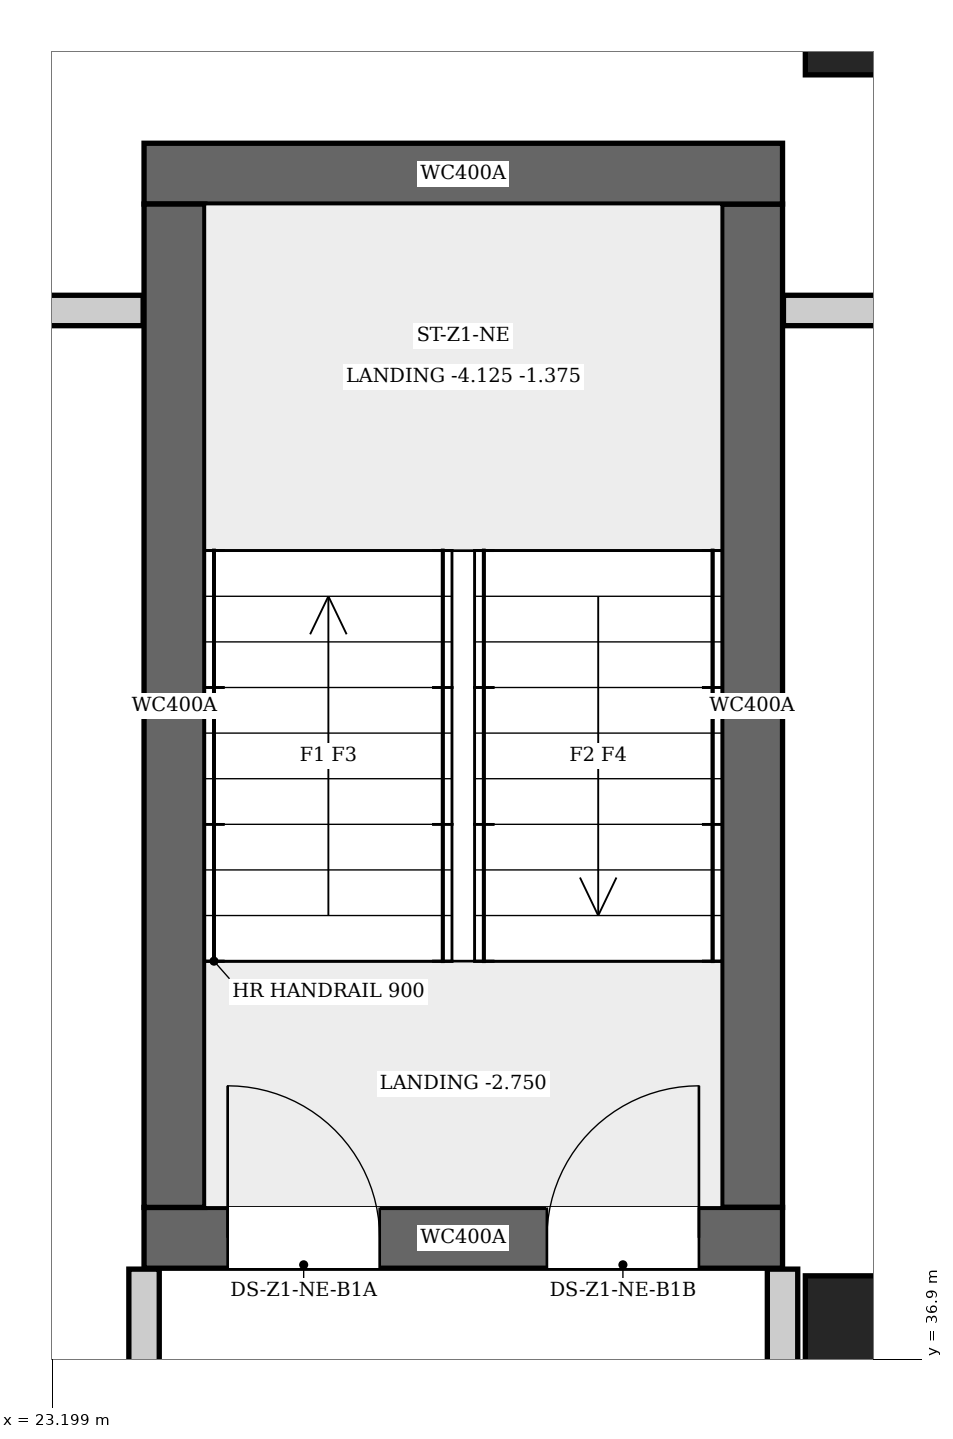
"""IFC4 building model, lengths in metres.
Left out: names, types, materials, properties, quantities, classifications, styles, units other than length and angle.
Written with IfcOpenShell. Run it as: python <this file> out.ifc"""

import sys

from ifc_helpers import new_model, si_unit, direction, frame, frame_2d, origin, origin_2d, place, context, subcontext, project, spatial, rectangle, extrude, element, fill, save


model = new_model("IFC4")
c1 = context("Model", 3, precision=1e-05, world=origin(), true_north=direction((0.0, 1.0)))
c2 = subcontext(c1, "Body", "Model", "MODEL_VIEW")
j1 = project(units=[si_unit("LENGTHUNIT", "METRE"), si_unit("PLANEANGLEUNIT", "RADIAN")], contexts=[c1])
p1 = place(None, origin())
s1 = spatial("IfcSite", under=j1, at=p1, CompositionType="ELEMENT")
p2 = place(p1, origin())
s2 = spatial("IfcBuilding", under=s1, at=p2, CompositionType="ELEMENT")
p3 = place(p2, frame((0.0, 0.0, -5.5)))
s3 = spatial("IfcBuildingStorey", under=s2, at=p3, CompositionType="ELEMENT", Elevation=-5.5)
p4 = place(p3, frame((23.8, 37.7, 0.0), z_axis=(0.0, 0.0, 1.0), x_axis=(1.0, 0.0, 0.0)))
e1 = element("IfcWall", 1, at=p4, inside=s3, PredefinedType="SHEAR", context=c2, shape_type="SweptSolid", body=[
    extrude(rectangle(XDim=4.2, YDim=0.4, at=frame_2d((2.1, 0.0))), origin(), (0.0, 0.0, 1.0), 5.5),
])
p5 = place(p4, frame((0.55, 0.0, 0.0)))
e2 = element("IfcOpeningElement", 2, at=p5, cuts=e1, PredefinedType="OPENING", context=c2, shape_type="SweptSolid", body=[
    extrude(rectangle(XDim=1.0, YDim=2.1, at=frame_2d((0.5, 1.05))), frame((0.0, 0.21, 0.0), z_axis=(0.0, -1.0, 0.0), x_axis=(1.0, 0.0, 0.0)), (0.0, 0.0, 1.0), 0.42),
])
p6 = place(p4, frame((2.65, 0.0, 0.0)))
e3 = element("IfcOpeningElement", 3, at=p6, cuts=e1, PredefinedType="OPENING", context=c2, shape_type="SweptSolid", body=[
    extrude(rectangle(XDim=1.0, YDim=2.1, at=frame_2d((0.5, 1.05))), frame((0.0, 0.21, 0.0), z_axis=(0.0, -1.0, 0.0), x_axis=(1.0, 0.0, 0.0)), (0.0, 0.0, 1.0), 0.42),
])
p7 = place(p3, frame((23.8, 44.7, 0.0), z_axis=(0.0, 0.0, 1.0), x_axis=(1.0, 0.0, 0.0)))
e4 = element("IfcWall", 4, at=p7, inside=s3, PredefinedType="SHEAR", context=c2, shape_type="SweptSolid", body=[
    extrude(rectangle(XDim=4.2, YDim=0.4, at=frame_2d((2.1, 0.0))), origin(), (0.0, 0.0, 1.0), 5.5),
])
for number, where, z_axis, x_axis in (
    (5, (24.0, 37.9, 0.0), (0.0, 0.0, 1.0), (0.0, 1.0, 0.0)),
    (6, (27.8, 37.9, 0.0), (0.0, 0.0, 1.0), (0.0, 1.0, 0.0)),
):
    element("IfcWall", number, at=place(p3, frame(where, z_axis=z_axis, x_axis=x_axis)), inside=s3, PredefinedType="SHEAR", context=c2, shape_type="SweptSolid", body=[
        extrude(rectangle(XDim=6.6, YDim=0.4, at=frame_2d((3.3, 0.0))), origin(), (0.0, 0.0, 1.0), 5.5),
    ])
for number, where, z_axis, x_axis in (
    (7, (28.8, 36.8, 0.0), (0.0, 0.0, 1.0), (1.0, 0.0, 0.0)),
    (8, (28.8, 46.0, 0.0), (0.0, 0.0, 1.0), (1.0, 0.0, 0.0)),
):
    element("IfcColumn", number, at=place(p3, frame(where, z_axis=z_axis, x_axis=x_axis)), inside=s3, PredefinedType="COLUMN", context=c2, shape_type="SweptSolid", body=[
        extrude(rectangle(XDim=1.3, YDim=1.3, at=origin_2d()), origin(), (0.0, 0.0, 1.0), 5.5),
    ])
p8 = place(p3, frame((8.906, 43.8, 0.0), z_axis=(0.0, 0.0, 1.0), x_axis=(1.0, 0.0, 0.0)))
e9 = element("IfcWall", 9, at=p8, inside=s3, PredefinedType="PARTITIONING", context=c2, shape_type="SweptSolid", body=[
    extrude(rectangle(XDim=14.888, YDim=0.2, at=frame_2d((7.444, 0.0))), origin(), (0.0, 0.0, 1.0), 5.15),
])
p9 = place(p8, frame((6.944, 0.0, 0.0)))
e10 = element("IfcOpeningElement", 10, at=p9, cuts=e9, PredefinedType="OPENING", context=c2, shape_type="SweptSolid", body=[
    extrude(rectangle(XDim=1.0, YDim=2.1, at=frame_2d((0.5, 1.05))), frame((0.0, 0.11, 0.0), z_axis=(0.0, -1.0, 0.0), x_axis=(1.0, 0.0, 0.0)), (0.0, 0.0, 1.0), 0.22),
])
for number, where, z_axis, x_axis in (
    (11, (23.8, 36.1, 0.0), (0.0, 0.0, 1.0), (0.0, 1.0, 0.0)),
    (12, (28.0, 36.1, 0.0), (0.0, 0.0, 1.0), (0.0, 1.0, 0.0)),
):
    element("IfcWall", number, at=place(p3, frame(where, z_axis=z_axis, x_axis=x_axis)), inside=s3, PredefinedType="PARTITIONING", context=c2, shape_type="SweptSolid", body=[
        extrude(rectangle(XDim=1.394, YDim=0.2, at=frame_2d((0.697, 0.0))), origin(), (0.0, 0.0, 1.0), 5.15),
    ])
p10 = place(p3, frame((28.006, 43.8, 0.0), z_axis=(0.0, 0.0, 1.0), x_axis=(1.0, 0.0, 0.0)))
e13 = element("IfcWall", 13, at=p10, inside=s3, PredefinedType="PARTITIONING", context=c2, shape_type="SweptSolid", body=[
    extrude(rectangle(XDim=29.188, YDim=0.2, at=frame_2d((14.594, 0.0))), origin(), (0.0, 0.0, 1.0), 5.15),
])
p11 = place(p10, frame((8.082, 0.0, 0.0)))
e14 = element("IfcOpeningElement", 14, at=p11, cuts=e13, PredefinedType="OPENING", context=c2, shape_type="SweptSolid", body=[
    extrude(rectangle(XDim=1.0, YDim=2.1, at=frame_2d((0.5, 1.05))), frame((0.0, 0.11, 0.0), z_axis=(0.0, -1.0, 0.0), x_axis=(1.0, 0.0, 0.0)), (0.0, 0.0, 1.0), 0.22),
])
p12 = place(p10, frame((22.506, 0.0, 0.0)))
e15 = element("IfcOpeningElement", 15, at=p12, cuts=e13, PredefinedType="OPENING", context=c2, shape_type="SweptSolid", body=[
    extrude(rectangle(XDim=1.0, YDim=2.1, at=frame_2d((0.5, 1.05))), frame((0.0, 0.11, 0.0), z_axis=(0.0, -1.0, 0.0), x_axis=(1.0, 0.0, 0.0)), (0.0, 0.0, 1.0), 0.22),
])
p13 = place(p5, origin())
e16 = element("IfcDoor", 16, at=p13, inside=s3, OperationType="SINGLE_SWING_RIGHT", PredefinedType="DOOR", context=c2, shape_type="SweptSolid", body=[
    extrude(rectangle(XDim=1.0, YDim=2.1, at=frame_2d((0.5, 1.05))), frame((0.0, 0.025, 0.0), z_axis=(0.0, -1.0, 0.0), x_axis=(1.0, 0.0, 0.0)), (0.0, 0.0, 1.0), 0.05),
])
fill(e2, e16)
p14 = place(p6, origin())
e17 = element("IfcDoor", 17, at=p14, inside=s3, OperationType="SINGLE_SWING_LEFT", PredefinedType="DOOR", context=c2, shape_type="SweptSolid", body=[
    extrude(rectangle(XDim=1.0, YDim=2.1, at=frame_2d((0.5, 1.05))), frame((0.0, 0.025, 0.0), z_axis=(0.0, -1.0, 0.0), x_axis=(1.0, 0.0, 0.0)), (0.0, 0.0, 1.0), 0.05),
])
fill(e3, e17)
save(model, sys.argv[1])
